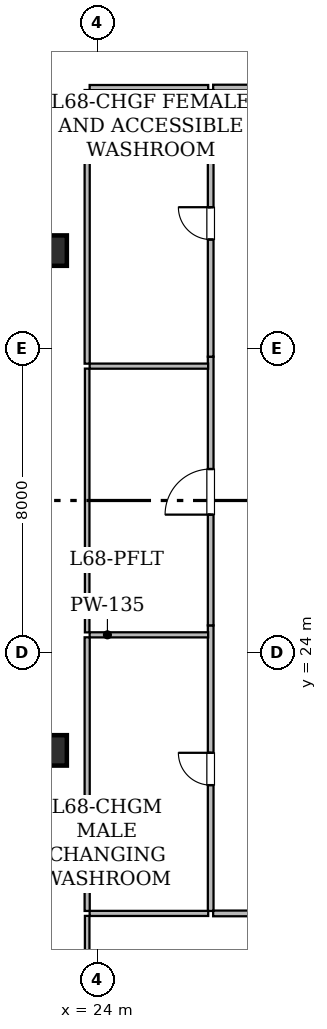
"""IFC4 building model, lengths in metres.
Left out: names, types, materials, properties, quantities, classifications, styles, units other than length and angle.
Written with IfcOpenShell. Run it as: python <this file> out.ifc"""

import sys

from ifc_helpers import new_model, si_unit, direction, frame, frame_2d, origin, origin_2d, place, context, subcontext, project, spatial, rectangle, hollow_rectangle, extrude, element, fill, save


model = new_model("IFC4")
c1 = context("Model", 3, precision=1e-05, world=origin(), true_north=direction((0.0, 1.0)))
c2 = subcontext(c1, "Body", "Model", "MODEL_VIEW")
j1 = project(units=[si_unit("LENGTHUNIT", "METRE"), si_unit("PLANEANGLEUNIT", "RADIAN")], contexts=[c1])
p1 = place(None, origin())
s1 = spatial("IfcSite", under=j1, at=p1, CompositionType="ELEMENT")
p2 = place(p1, origin())
s2 = spatial("IfcBuilding", under=s1, at=p2, CompositionType="ELEMENT")
p3 = place(p2, frame((0.0, 0.0, 264.65)))
s3 = spatial("IfcBuildingStorey", under=s2, at=p3, CompositionType="ELEMENT", Elevation=264.65)
for number, where, z_axis, x_axis in (
    (1, (22.8, 21.425, 0.0), (0.0, 0.0, 1.0), (1.0, 0.0, 0.0)),
    (2, (22.8, 34.575, 0.0), (0.0, 0.0, 1.0), (1.0, 0.0, 0.0)),
):
    element("IfcColumn", number, at=place(p3, frame(where, z_axis=z_axis, x_axis=x_axis)), inside=s3, PredefinedType="COLUMN", context=c2, shape_type="SweptSolid", body=[
        extrude(hollow_rectangle(XDim=0.8, YDim=0.8, WallThickness=0.04, at=origin_2d()), origin(), (0.0, 0.0, 1.0), 4.775),
    ])
p4 = place(p3, frame((26.985, 17.2, 0.0), z_axis=(0.0, 0.0, 1.0), x_axis=(0.0, 1.0, 0.0)))
e3 = element("IfcWall", 3, at=p4, inside=s3, PredefinedType="STANDARD", context=c2, shape_type="SweptSolid", body=[
    extrude(rectangle(XDim=7.514, YDim=0.15, at=frame_2d((3.757, 0.0))), origin(), (0.0, 0.0, 1.0), 2.82),
])
p5 = place(p4, frame((3.311, 0.0, 0.0)))
e4 = element("IfcOpeningElement", 4, at=p5, cuts=e3, PredefinedType="OPENING", context=c2, shape_type="SweptSolid", body=[
    extrude(rectangle(XDim=0.85, YDim=2.1, at=frame_2d((0.425, 1.05))), frame((0.0, 0.085, 0.0), z_axis=(0.0, -1.0, 0.0), x_axis=(1.0, 0.0, 0.0)), (0.0, 0.0, 1.0), 0.17),
])
p6 = place(p3, frame((26.985, 24.714, 0.0), z_axis=(0.0, 0.0, 1.0), x_axis=(0.0, 1.0, 0.0)))
e5 = element("IfcWall", 5, at=p6, inside=s3, PredefinedType="STANDARD", context=c2, shape_type="SweptSolid", body=[
    extrude(rectangle(XDim=7.07, YDim=0.15, at=frame_2d((3.535, 0.0))), origin(), (0.0, 0.0, 1.0), 4.38),
])
p7 = place(p6, frame((2.914, 0.0, 0.0)))
e6 = element("IfcOpeningElement", 6, at=p7, cuts=e5, PredefinedType="OPENING", context=c2, shape_type="SweptSolid", body=[
    extrude(rectangle(XDim=1.2, YDim=2.15, at=frame_2d((0.6, 1.075))), frame((0.0, 0.085, 0.0), z_axis=(0.0, -1.0, 0.0), x_axis=(1.0, 0.0, 0.0)), (0.0, 0.0, 1.0), 0.17),
])
p8 = place(p3, frame((26.985, 31.784, 0.0), z_axis=(0.0, 0.0, 1.0), x_axis=(0.0, 1.0, 0.0)))
e7 = element("IfcWall", 7, at=p8, inside=s3, PredefinedType="STANDARD", context=c2, shape_type="SweptSolid", body=[
    extrude(rectangle(XDim=7.016, YDim=0.15, at=frame_2d((3.508, 0.0))), origin(), (0.0, 0.0, 1.0), 2.82),
])
p9 = place(p8, frame((3.083, 0.0, 0.0)))
e8 = element("IfcOpeningElement", 8, at=p9, cuts=e7, PredefinedType="OPENING", context=c2, shape_type="SweptSolid", body=[
    extrude(rectangle(XDim=0.85, YDim=2.1, at=frame_2d((0.425, 1.05))), frame((0.0, 0.085, 0.0), z_axis=(0.0, -1.0, 0.0), x_axis=(1.0, 0.0, 0.0)), (0.0, 0.0, 1.0), 0.17),
])
p10 = place(p3, frame((43.8, 17.135, 0.0), z_axis=(0.0, 0.0, 1.0), x_axis=(-1.0, 0.0, 0.0)))
e9 = element("IfcWall", 9, at=p10, inside=s3, PredefinedType="STANDARD", context=c2, shape_type="SweptSolid", body=[
    extrude(rectangle(XDim=16.75, YDim=0.15, at=frame_2d((8.375, 0.0))), origin(), (0.0, 0.0, 1.0), 2.82),
])
p11 = place(p10, frame((7.925, 0.0, 0.0)))
e10 = element("IfcOpeningElement", 10, at=p11, cuts=e9, PredefinedType="OPENING", context=c2, shape_type="SweptSolid", body=[
    extrude(rectangle(XDim=0.9, YDim=2.1, at=frame_2d((0.45, 1.05))), frame((0.0, 0.085, 0.0), z_axis=(0.0, -1.0, 0.0), x_axis=(1.0, 0.0, 0.0)), (0.0, 0.0, 1.0), 0.17),
])
p12 = place(p3, frame((27.05, 38.865, 0.0), z_axis=(0.0, 0.0, 1.0), x_axis=(1.0, 0.0, 0.0)))
e11 = element("IfcWall", 11, at=p12, inside=s3, PredefinedType="STANDARD", context=c2, shape_type="SweptSolid", body=[
    extrude(rectangle(XDim=16.75, YDim=0.15, at=frame_2d((8.375, 0.0))), origin(), (0.0, 0.0, 1.0), 2.82),
])
p13 = place(p12, frame((7.925, 0.0, 0.0)))
e12 = element("IfcOpeningElement", 12, at=p13, cuts=e11, PredefinedType="OPENING", context=c2, shape_type="SweptSolid", body=[
    extrude(rectangle(XDim=0.9, YDim=2.1, at=frame_2d((0.45, 1.05))), frame((0.0, 0.085, 0.0), z_axis=(0.0, -1.0, 0.0), x_axis=(1.0, 0.0, 0.0)), (0.0, 0.0, 1.0), 0.17),
])
p14 = place(p3, frame((23.8, 24.465, 0.0), z_axis=(0.0, 0.0, 1.0), x_axis=(1.0, 0.0, 0.0)))
e13 = element("IfcWall", 13, at=p14, inside=s3, PredefinedType="PARTITIONING", context=c2, shape_type="SweptSolid", body=[
    extrude(rectangle(XDim=3.118, YDim=0.135, at=frame_2d((1.559, 0.0))), origin(), (0.0, 0.0, 1.0), 4.38),
])
p15 = place(p3, frame((26.92, 17.135, 0.0), z_axis=(0.0, 0.0, 1.0), x_axis=(-1.0, 0.0, 0.0)))
e14 = element("IfcWall", 14, at=p15, inside=s3, PredefinedType="PARTITIONING", context=c2, shape_type="SweptSolid", body=[
    extrude(rectangle(XDim=3.12, YDim=0.135, at=frame_2d((1.56, 0.0))), origin(), (0.0, 0.0, 1.0), 2.82),
])
p16 = place(p3, frame((23.735, 17.2, 0.0), z_axis=(0.0, 0.0, 1.0), x_axis=(0.0, 1.0, 0.0)))
e15 = element("IfcWall", 15, at=p16, inside=s3, PredefinedType="PARTITIONING", context=c2, shape_type="SweptSolid", body=[
    extrude(rectangle(XDim=7.2, YDim=0.135, at=frame_2d((3.6, 0.0))), origin(), (0.0, 0.0, 1.0), 2.82),
])
p17 = place(p3, frame((23.8, 31.535, 0.0), z_axis=(0.0, 0.0, 1.0), x_axis=(1.0, 0.0, 0.0)))
e16 = element("IfcWall", 16, at=p17, inside=s3, PredefinedType="PARTITIONING", context=c2, shape_type="SweptSolid", body=[
    extrude(rectangle(XDim=3.118, YDim=0.135, at=frame_2d((1.559, 0.0))), origin(), (0.0, 0.0, 1.0), 4.38),
])
p18 = place(p3, frame((23.735, 24.53, 0.0), z_axis=(0.0, 0.0, 1.0), x_axis=(0.0, 1.0, 0.0)))
e17 = element("IfcWall", 17, at=p18, inside=s3, PredefinedType="PARTITIONING", context=c2, shape_type="SweptSolid", body=[
    extrude(rectangle(XDim=6.94, YDim=0.12, at=frame_2d((3.47, 0.0))), origin(), (0.0, 0.0, 1.0), 4.38),
])
p19 = place(p3, frame((23.8, 38.865, 0.0), z_axis=(0.0, 0.0, 1.0), x_axis=(1.0, 0.0, 0.0)))
e18 = element("IfcWall", 18, at=p19, inside=s3, PredefinedType="PARTITIONING", context=c2, shape_type="SweptSolid", body=[
    extrude(rectangle(XDim=3.12, YDim=0.135, at=frame_2d((1.56, 0.0))), origin(), (0.0, 0.0, 1.0), 2.82),
])
p20 = place(p3, frame((23.735, 31.6, 0.0), z_axis=(0.0, 0.0, 1.0), x_axis=(0.0, 1.0, 0.0)))
e19 = element("IfcWall", 19, at=p20, inside=s3, PredefinedType="PARTITIONING", context=c2, shape_type="SweptSolid", body=[
    extrude(rectangle(XDim=7.2, YDim=0.135, at=frame_2d((3.6, 0.0))), origin(), (0.0, 0.0, 1.0), 2.82),
])
p21 = place(p3, frame((23.735, 12.613, 0.0), z_axis=(0.0, 0.0, 1.0), x_axis=(0.0, 1.0, 0.0)))
e20 = element("IfcWall", 20, at=p21, inside=s3, PredefinedType="PARTITIONING", context=c2, shape_type="SweptSolid", body=[
    extrude(rectangle(XDim=4.457, YDim=0.12, at=frame_2d((2.229, 0.0))), origin(), (0.0, 0.0, 1.0), 4.38),
])
p22 = place(p5, origin())
e21 = element("IfcDoor", 21, at=p22, inside=s3, OperationType="SINGLE_SWING_RIGHT", PredefinedType="DOOR", context=c2, shape_type="SweptSolid", body=[
    extrude(rectangle(XDim=0.85, YDim=2.1, at=frame_2d((0.425, 1.05))), frame((0.0, 0.025, 0.0), z_axis=(0.0, -1.0, 0.0), x_axis=(1.0, 0.0, 0.0)), (0.0, 0.0, 1.0), 0.05),
])
fill(e4, e21)
p23 = place(p7, origin())
e22 = element("IfcDoor", 22, at=p23, inside=s3, OperationType="SINGLE_SWING_LEFT", PredefinedType="DOOR", context=c2, shape_type="SweptSolid", body=[
    extrude(rectangle(XDim=1.2, YDim=2.15, at=frame_2d((0.6, 1.075))), frame((0.0, 0.025, 0.0), z_axis=(0.0, -1.0, 0.0), x_axis=(1.0, 0.0, 0.0)), (0.0, 0.0, 1.0), 0.05),
])
fill(e6, e22)
p24 = place(p9, origin())
e23 = element("IfcDoor", 23, at=p24, inside=s3, OperationType="SINGLE_SWING_RIGHT", PredefinedType="DOOR", context=c2, shape_type="SweptSolid", body=[
    extrude(rectangle(XDim=0.85, YDim=2.1, at=frame_2d((0.425, 1.05))), frame((0.0, 0.025, 0.0), z_axis=(0.0, -1.0, 0.0), x_axis=(1.0, 0.0, 0.0)), (0.0, 0.0, 1.0), 0.05),
])
fill(e8, e23)
save(model, sys.argv[1])
